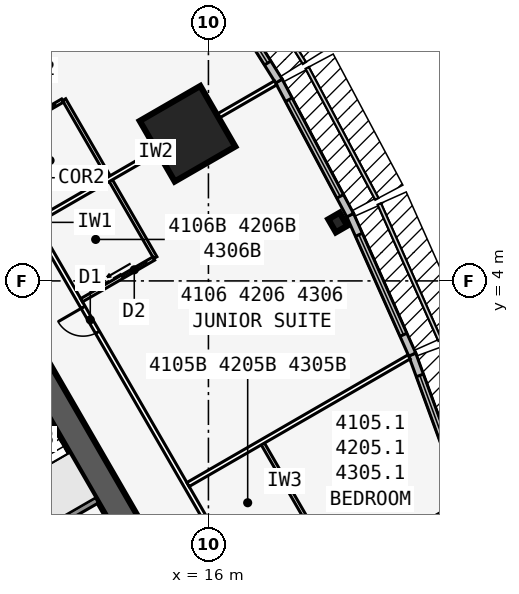
"""IFC4 building model, lengths in metres.
Left out: names, types, materials, properties, quantities, classifications, styles, units other than length and angle.
Written with IfcOpenShell. Run it as: python <this file> out.ifc"""

import sys

from ifc_helpers import new_model, si_unit, direction, frame, frame_2d, origin, origin_2d, place, context, subcontext, project, spatial, rectangle, i_section, extrude, element, fill, save


model = new_model("IFC4")
c1 = context("Model", 3, precision=1e-05, world=origin(), true_north=direction((0.0, 1.0)))
c2 = subcontext(c1, "Body", "Model", "MODEL_VIEW")
j1 = project(units=[si_unit("LENGTHUNIT", "METRE"), si_unit("PLANEANGLEUNIT", "RADIAN")], contexts=[c1])
p1 = place(None, origin())
s1 = spatial("IfcSite", under=j1, at=p1, CompositionType="ELEMENT")
p2 = place(p1, origin())
s2 = spatial("IfcBuilding", under=s1, at=p2, CompositionType="ELEMENT")
p3 = place(p2, frame((0.0, 0.0, 155.5)))
s3 = spatial("IfcBuildingStorey", under=s2, at=p3, CompositionType="ELEMENT", Elevation=155.5)
p4 = place(p3, frame((16.5, -9.526, 0.0), z_axis=(0.0, 0.0, 1.0), x_axis=(-0.499999749417, 0.866025548458, 0.0)))
e1 = element("IfcWall", 1, at=p4, inside=s3, PredefinedType="SHEAR", context=c2, shape_type="SweptSolid", body=[
    extrude(rectangle(XDim=33.0, YDim=0.9, at=frame_2d((16.5, 0.0))), origin(), (0.0, 0.0, 1.0), 3.4),
])
p5 = place(p4, frame((14.15, 0.0, 0.0)))
e2 = element("IfcOpeningElement", 2, at=p5, cuts=e1, PredefinedType="OPENING", context=c2, shape_type="SweptSolid", body=[
    extrude(rectangle(XDim=1.8, YDim=2.13, at=frame_2d((0.9, 1.065))), frame((0.0, 0.46, 0.0), z_axis=(0.0, -1.0, 0.0), x_axis=(1.0, 0.0, 0.0)), (0.0, 0.0, 1.0), 0.92),
])
p6 = place(p4, frame((12.6, 0.0, 0.0)))
e3 = element("IfcOpeningElement", 3, at=p6, cuts=e1, PredefinedType="OPENING", context=c2, shape_type="SweptSolid", body=[
    extrude(rectangle(XDim=1.0, YDim=2.13, at=frame_2d((0.5, 1.065))), frame((0.0, 0.46, 0.0), z_axis=(0.0, -1.0, 0.0), x_axis=(1.0, 0.0, 0.0)), (0.0, 0.0, 1.0), 0.92),
])
p7 = place(p3, frame((9.629, -4.775, 0.0), z_axis=(0.0, 0.0, 1.0), x_axis=(0.866022959057, 0.500004234368, 0.0)))
e4 = element("IfcWall", 4, at=p7, inside=s3, PredefinedType="SOLIDWALL", context=c2, shape_type="SweptSolid", body=[
    extrude(rectangle(XDim=3.125, YDim=0.2, at=frame_2d((1.562, 0.0))), origin(), (0.0, 0.0, 1.0), 3.235),
])
p8 = place(p3, frame((20.254, 5.92, 0.0), z_axis=(0.0, 0.0, 1.0), x_axis=(0.866025403784, 0.5, 0.0)))
e5 = element("IfcColumn", 5, at=p8, inside=s3, PredefinedType="COLUMN", context=c2, shape_type="SweptSolid", body=[
    extrude(i_section(OverallWidth=0.432, OverallDepth=0.498, WebThickness=0.056, FlangeThickness=0.089, at=origin_2d()), origin(), (0.0, 0.0, 1.0), 3.4),
])
p9 = place(p3, frame((15.312, 8.84, 0.0), z_axis=(0.0, 0.0, 1.0), x_axis=(0.866025403784, 0.5, 0.0)))
e6 = element("IfcColumn", 6, at=p9, inside=s3, PredefinedType="COLUMN", context=c2, shape_type="SweptSolid", body=[
    extrude(rectangle(XDim=2.3, YDim=2.3, at=origin_2d()), origin(), (0.0, 0.0, 1.0), 3.4),
])
p10 = place(p3, frame((24.444, -3.183, 0.0), z_axis=(0.0, 0.0, 1.0), x_axis=(-0.343225593282, 0.939252996863, 0.0)))
e7 = element("IfcWall", 7, at=p10, inside=s3, PredefinedType="STANDARD", context=c2, shape_type="SweptSolid", body=[
    extrude(rectangle(XDim=5.076, YDim=0.25, at=frame_2d((2.538, 0.0))), origin(), (0.0, 0.0, 1.0), 3.235),
])
p11 = place(p10, frame((0.738, 0.0, 0.45)))
e8 = element("IfcOpeningElement", 8, at=p11, cuts=e7, PredefinedType="OPENING", context=c2, shape_type="SweptSolid", body=[
    extrude(rectangle(XDim=3.6, YDim=2.4, at=frame_2d((1.8, 1.2))), frame((0.0, 0.135, 0.0), z_axis=(0.0, -1.0, 0.0), x_axis=(1.0, 0.0, 0.0)), (0.0, 0.0, 1.0), 0.27),
])
p12 = place(p3, frame((22.705, 1.576, 0.0), z_axis=(0.0, 0.0, 1.0), x_axis=(-0.406832200364, 0.913502906808, 0.0)))
e9 = element("IfcWall", 9, at=p12, inside=s3, PredefinedType="STANDARD", context=c2, shape_type="SweptSolid", body=[
    extrude(rectangle(XDim=5.028, YDim=0.25, at=frame_2d((2.514, 0.0))), origin(), (0.0, 0.0, 1.0), 3.235),
])
p13 = place(p12, frame((0.714, 0.0, 0.45)))
e10 = element("IfcOpeningElement", 10, at=p13, cuts=e9, PredefinedType="OPENING", context=c2, shape_type="SweptSolid", body=[
    extrude(rectangle(XDim=3.6, YDim=2.4, at=frame_2d((1.8, 1.2))), frame((0.0, 0.135, 0.0), z_axis=(0.0, -1.0, 0.0), x_axis=(1.0, 0.0, 0.0)), (0.0, 0.0, 1.0), 0.27),
])
p14 = place(p3, frame((20.663, 6.161, 0.0), z_axis=(0.0, 0.0, 1.0), x_axis=(-0.469404966864, 0.882982999317, 0.0)))
e11 = element("IfcWall", 11, at=p14, inside=s3, PredefinedType="STANDARD", context=c2, shape_type="SweptSolid", body=[
    extrude(rectangle(XDim=5.003, YDim=0.25, at=frame_2d((2.501, 0.0))), origin(), (0.0, 0.0, 1.0), 3.235),
])
p15 = place(p14, frame((0.701, 0.0, 0.45)))
e12 = element("IfcOpeningElement", 12, at=p15, cuts=e11, PredefinedType="OPENING", context=c2, shape_type="SweptSolid", body=[
    extrude(rectangle(XDim=3.6, YDim=2.4, at=frame_2d((1.8, 1.2))), frame((0.0, 0.135, 0.0), z_axis=(0.0, -1.0, 0.0), x_axis=(1.0, 0.0, 0.0)), (0.0, 0.0, 1.0), 0.27),
])
p16 = place(p3, frame((18.319, 10.571, 0.0), z_axis=(0.0, 0.0, 1.0), x_axis=(-0.529990167382, 0.84800378683, 0.0)))
e13 = element("IfcWall", 13, at=p16, inside=s3, PredefinedType="STANDARD", context=c2, shape_type="SweptSolid", body=[
    extrude(rectangle(XDim=5.003, YDim=0.25, at=frame_2d((2.501, 0.0))), origin(), (0.0, 0.0, 1.0), 3.235),
])
p17 = place(p16, frame((0.701, 0.0, 0.45)))
e14 = element("IfcOpeningElement", 14, at=p17, cuts=e13, PredefinedType="OPENING", context=c2, shape_type="SweptSolid", body=[
    extrude(rectangle(XDim=3.6, YDim=2.4, at=frame_2d((1.8, 1.2))), frame((0.0, 0.135, 0.0), z_axis=(0.0, -1.0, 0.0), x_axis=(1.0, 0.0, 0.0)), (0.0, 0.0, 1.0), 0.27),
])
p18 = place(p3, frame((20.027, -10.985, 0.0), z_axis=(0.0, 0.0, 1.0), x_axis=(-0.500001677587, 0.866024435227, 0.0)))
e15 = element("IfcWall", 15, at=p18, inside=s3, PredefinedType="PARTITIONING", context=c2, shape_type="SweptSolid", body=[
    extrude(rectangle(XDim=39.054, YDim=0.15, at=frame_2d((19.527, 0.0))), origin(), (0.0, 0.0, 1.0), 3.235),
])
p19 = place(p18, frame((1.558, 0.0, 0.0)))
e16 = element("IfcOpeningElement", 16, at=p19, cuts=e15, PredefinedType="OPENING", context=c2, shape_type="SweptSolid", body=[
    extrude(rectangle(XDim=0.95, YDim=2.13, at=frame_2d((0.475, 1.065))), frame((0.0, 0.085, 0.0), z_axis=(0.0, -1.0, 0.0), x_axis=(1.0, 0.0, 0.0)), (0.0, 0.0, 1.0), 0.17),
])
p20 = place(p18, frame((15.352, 0.0, 0.0)))
e17 = element("IfcOpeningElement", 17, at=p20, cuts=e15, PredefinedType="OPENING", context=c2, shape_type="SweptSolid", body=[
    extrude(rectangle(XDim=0.95, YDim=2.13, at=frame_2d((0.475, 1.065))), frame((0.0, 0.085, 0.0), z_axis=(0.0, -1.0, 0.0), x_axis=(1.0, 0.0, 0.0)), (0.0, 0.0, 1.0), 0.17),
])
p21 = place(p18, frame((22.752, 0.0, 0.0)))
e18 = element("IfcOpeningElement", 18, at=p21, cuts=e15, PredefinedType="OPENING", context=c2, shape_type="SweptSolid", body=[
    extrude(rectangle(XDim=0.95, YDim=2.13, at=frame_2d((0.475, 1.065))), frame((0.0, 0.085, 0.0), z_axis=(0.0, -1.0, 0.0), x_axis=(1.0, 0.0, 0.0)), (0.0, 0.0, 1.0), 0.17),
])
p22 = place(p18, frame((30.952, 0.0, 0.0)))
e19 = element("IfcOpeningElement", 19, at=p22, cuts=e15, PredefinedType="OPENING", context=c2, shape_type="SweptSolid", body=[
    extrude(rectangle(XDim=0.95, YDim=2.13, at=frame_2d((0.475, 1.065))), frame((0.0, 0.085, 0.0), z_axis=(0.0, -1.0, 0.0), x_axis=(1.0, 0.0, 0.0)), (0.0, 0.0, 1.0), 0.17),
])
p23 = place(p18, frame((37.752, 0.0, 0.0)))
e20 = element("IfcOpeningElement", 20, at=p23, cuts=e15, PredefinedType="OPENING", context=c2, shape_type="SweptSolid", body=[
    extrude(rectangle(XDim=0.95, YDim=2.13, at=frame_2d((0.475, 1.065))), frame((0.0, 0.085, 0.0), z_axis=(0.0, -1.0, 0.0), x_axis=(1.0, 0.0, 0.0)), (0.0, 0.0, 1.0), 0.17),
])
p24 = place(p3, frame((17.829, -7.027, 0.0), z_axis=(0.0, 0.0, 1.0), x_axis=(0.866029804378, 0.499992377871, 0.0)))
e21 = element("IfcWall", 21, at=p24, inside=s3, PredefinedType="PARTITIONING", context=c2, shape_type="SweptSolid", body=[
    extrude(rectangle(XDim=7.516, YDim=0.1, at=frame_2d((3.758, 0.0))), origin(), (0.0, 0.0, 1.0), 2.389),
])
p25 = place(p24, frame((0.45, 0.0, 0.0)))
e22 = element("IfcOpeningElement", 22, at=p25, cuts=e21, PredefinedType="OPENING", context=c2, shape_type="SweptSolid", body=[
    extrude(rectangle(XDim=0.9, YDim=2.13, at=frame_2d((0.45, 1.065))), frame((0.0, 0.06, 0.0), z_axis=(0.0, -1.0, 0.0), x_axis=(1.0, 0.0, 0.0)), (0.0, 0.0, 1.0), 0.12),
])
p26 = place(p3, frame((15.329, -2.697, 0.0), z_axis=(0.0, 0.0, 1.0), x_axis=(0.866024316602, 0.50000188305, 0.0)))
e23 = element("IfcWall", 23, at=p26, inside=s3, PredefinedType="PARTITIONING", context=c2, shape_type="SweptSolid", body=[
    extrude(rectangle(XDim=8.395, YDim=0.15, at=frame_2d((4.198, 0.0))), origin(), (0.0, 0.0, 1.0), 2.389),
])
p27 = place(p3, frame((10.329, 5.963, 0.0), z_axis=(0.0, 0.0, 1.0), x_axis=(0.866025170687, 0.500000403736, 0.0)))
e24 = element("IfcWall", 24, at=p27, inside=s3, PredefinedType="PARTITIONING", context=c2, shape_type="SweptSolid", body=[
    extrude(rectangle(XDim=9.099, YDim=0.15, at=frame_2d((4.549, 0.0))), origin(), (0.0, 0.0, 1.0), 2.389),
])
p28 = place(p3, frame((19.253, -3.895, 0.0), z_axis=(0.0, 0.0, 1.0), x_axis=(-0.499990139034, 0.866031096941, 0.0)))
e25 = element("IfcWall", 25, at=p28, inside=s3, PredefinedType="PLUMBINGWALL", context=c2, shape_type="SweptSolid", body=[
    extrude(rectangle(XDim=3.0, YDim=0.12, at=frame_2d((1.5, 0.0))), origin(), (0.0, 0.0, 1.0), 3.235),
])
p29 = place(p3, frame((14.253, 4.765, 0.0), z_axis=(0.0, 0.0, 1.0), x_axis=(-0.50002537861, 0.866010750942, 0.0)))
e26 = element("IfcWall", 26, at=p29, inside=s3, PredefinedType="PLUMBINGWALL", context=c2, shape_type="SweptSolid", body=[
    extrude(rectangle(XDim=3.0, YDim=0.12, at=frame_2d((1.5, 0.0))), origin(), (0.0, 0.0, 1.0), 3.235),
])
p30 = place(p3, frame((11.829, 3.365, 0.0), z_axis=(0.0, 0.0, 1.0), x_axis=(0.865997131366, 0.500048966069, 0.0)))
e27 = element("IfcWall", 27, at=p30, inside=s3, PredefinedType="PLUMBINGWALL", context=c2, shape_type="SweptSolid", body=[
    extrude(rectangle(XDim=2.74, YDim=0.12, at=frame_2d((1.37, 0.0))), origin(), (0.0, 0.0, 1.0), 3.235),
])
p31 = place(p30, frame((1.55, 0.0, 0.0)))
e28 = element("IfcOpeningElement", 28, at=p31, cuts=e27, PredefinedType="OPENING", context=c2, shape_type="SweptSolid", body=[
    extrude(rectangle(XDim=0.9, YDim=2.13, at=frame_2d((0.45, 1.065))), frame((0.0, 0.07, 0.0), z_axis=(0.0, -1.0, 0.0), x_axis=(1.0, 0.0, 0.0)), (0.0, 0.0, 1.0), 0.14),
])
p32 = place(p3, frame((12.753, 7.363, 0.0), z_axis=(0.0, 0.0, 1.0), x_axis=(-0.499990139034, 0.866031096941, 0.0)))
e29 = element("IfcWall", 29, at=p32, inside=s3, PredefinedType="PLUMBINGWALL", context=c2, shape_type="SweptSolid", body=[
    extrude(rectangle(XDim=3.0, YDim=0.12, at=frame_2d((1.5, 0.0))), origin(), (0.0, 0.0, 1.0), 3.235),
])
p33 = place(p3, frame((8.829, 8.561, 0.0), z_axis=(0.0, 0.0, 1.0), x_axis=(0.866035715982, 0.499982138324, 0.0)))
e30 = element("IfcWall", 30, at=p33, inside=s3, PredefinedType="PLUMBINGWALL", context=c2, shape_type="SweptSolid", body=[
    extrude(rectangle(XDim=2.74, YDim=0.12, at=frame_2d((1.37, 0.0))), origin(), (0.0, 0.0, 1.0), 3.235),
])
p34 = place(p33, frame((1.55, 0.0, 0.0)))
e31 = element("IfcOpeningElement", 31, at=p34, cuts=e30, PredefinedType="OPENING", context=c2, shape_type="SweptSolid", body=[
    extrude(rectangle(XDim=0.9, YDim=2.13, at=frame_2d((0.45, 1.065))), frame((0.0, 0.07, 0.0), z_axis=(0.0, -1.0, 0.0), x_axis=(1.0, 0.0, 0.0)), (0.0, 0.0, 1.0), 0.14),
])
p35 = place(p11, origin())
e32 = element("IfcWindow", 32, at=p35, inside=s3, PartitioningType="SINGLE_PANEL", PredefinedType="WINDOW", context=c2, shape_type="SweptSolid", body=[
    extrude(rectangle(XDim=3.6, YDim=2.4, at=frame_2d((1.8, 1.2))), frame((0.0, 0.03, 0.0), z_axis=(0.0, -1.0, 0.0), x_axis=(1.0, 0.0, 0.0)), (0.0, 0.0, 1.0), 0.06),
])
fill(e8, e32)
p36 = place(p13, origin())
e33 = element("IfcWindow", 33, at=p36, inside=s3, PartitioningType="SINGLE_PANEL", PredefinedType="WINDOW", context=c2, shape_type="SweptSolid", body=[
    extrude(rectangle(XDim=3.6, YDim=2.4, at=frame_2d((1.8, 1.2))), frame((0.0, 0.03, 0.0), z_axis=(0.0, -1.0, 0.0), x_axis=(1.0, 0.0, 0.0)), (0.0, 0.0, 1.0), 0.06),
])
fill(e10, e33)
p37 = place(p15, origin())
e34 = element("IfcWindow", 34, at=p37, inside=s3, PartitioningType="SINGLE_PANEL", PredefinedType="WINDOW", context=c2, shape_type="SweptSolid", body=[
    extrude(rectangle(XDim=3.6, YDim=2.4, at=frame_2d((1.8, 1.2))), frame((0.0, 0.03, 0.0), z_axis=(0.0, -1.0, 0.0), x_axis=(1.0, 0.0, 0.0)), (0.0, 0.0, 1.0), 0.06),
])
fill(e12, e34)
p38 = place(p17, origin())
e35 = element("IfcWindow", 35, at=p38, inside=s3, PartitioningType="SINGLE_PANEL", PredefinedType="WINDOW", context=c2, shape_type="SweptSolid", body=[
    extrude(rectangle(XDim=3.6, YDim=2.4, at=frame_2d((1.8, 1.2))), frame((0.0, 0.03, 0.0), z_axis=(0.0, -1.0, 0.0), x_axis=(1.0, 0.0, 0.0)), (0.0, 0.0, 1.0), 0.06),
])
fill(e14, e35)
p39 = place(p31, origin())
e36 = element("IfcDoor", 36, at=p39, inside=s3, OperationType="SLIDING_TO_LEFT", PredefinedType="DOOR", context=c2, shape_type="SweptSolid", body=[
    extrude(rectangle(XDim=0.9, YDim=2.13, at=frame_2d((0.45, 1.065))), frame((0.0, 0.025, 0.0), z_axis=(0.0, -1.0, 0.0), x_axis=(1.0, 0.0, 0.0)), (0.0, 0.0, 1.0), 0.05),
])
fill(e28, e36)
p40 = place(p20, origin())
e37 = element("IfcDoor", 37, at=p40, inside=s3, OperationType="SINGLE_SWING_RIGHT", PredefinedType="DOOR", context=c2, shape_type="SweptSolid", body=[
    extrude(rectangle(XDim=0.95, YDim=2.13, at=frame_2d((0.475, 1.065))), frame((0.0, 0.025, 0.0), z_axis=(0.0, -1.0, 0.0), x_axis=(1.0, 0.0, 0.0)), (0.0, 0.0, 1.0), 0.05),
])
fill(e17, e37)
p41 = place(p34, origin())
e38 = element("IfcDoor", 38, at=p41, inside=s3, OperationType="SLIDING_TO_LEFT", PredefinedType="DOOR", context=c2, shape_type="SweptSolid", body=[
    extrude(rectangle(XDim=0.9, YDim=2.13, at=frame_2d((0.45, 1.065))), frame((0.0, 0.025, 0.0), z_axis=(0.0, -1.0, 0.0), x_axis=(1.0, 0.0, 0.0)), (0.0, 0.0, 1.0), 0.05),
])
fill(e31, e38)
save(model, sys.argv[1])
